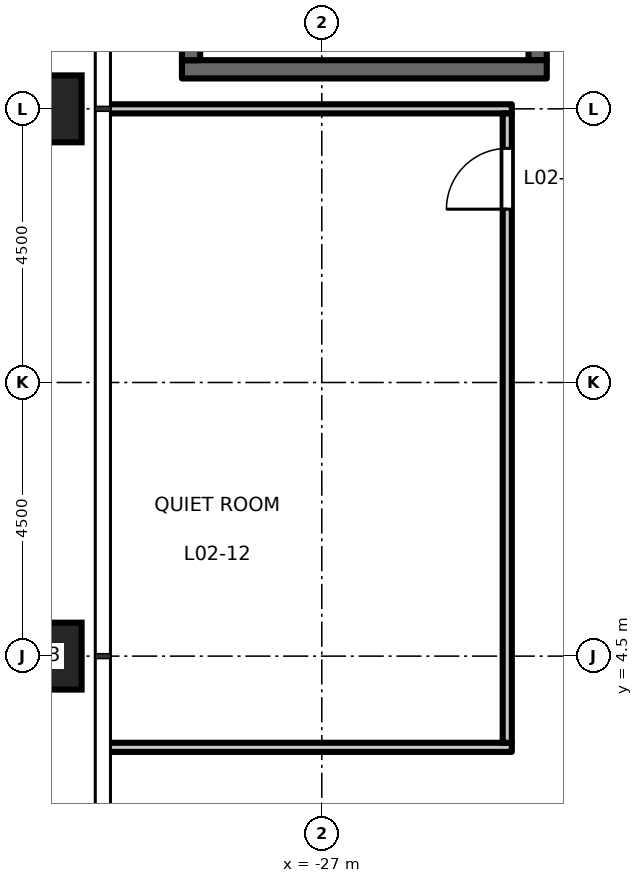
"""IFC4 building model, lengths in metres.
Left out: names, types, materials, properties, quantities, classifications, styles, units other than length and angle.
Written with IfcOpenShell. Run it as: python <this file> out.ifc"""

import sys

from ifc_helpers import new_model, si_unit, direction, frame, frame_2d, origin, origin_2d, place, context, subcontext, project, spatial, rectangle, hollow_rectangle, extrude, element, fill, save


model = new_model("IFC4")
c1 = context("Model", 3, precision=1e-05, world=origin(), true_north=direction((0.0, 1.0)))
c2 = subcontext(c1, "Body", "Model", "MODEL_VIEW")
j1 = project(units=[si_unit("LENGTHUNIT", "METRE"), si_unit("PLANEANGLEUNIT", "RADIAN")], contexts=[c1])
p1 = place(None, origin())
s1 = spatial("IfcSite", under=j1, at=p1, CompositionType="ELEMENT")
p2 = place(p1, origin())
s2 = spatial("IfcBuilding", under=s1, at=p2, CompositionType="ELEMENT")
p3 = place(p2, frame((0.0, 0.0, 12.2)))
s3 = spatial("IfcBuildingStorey", under=s2, at=p3, CompositionType="ELEMENT", Elevation=12.2)
for number, where, z_axis, x_axis in (
    (1, (-31.5, 13.5, 0.0), (0.0, 0.0, 1.0), (1.0, 0.0, 0.0)),
    (2, (-31.5, 4.5, 0.0), (0.0, 0.0, 1.0), (1.0, 0.0, 0.0)),
):
    element("IfcColumn", number, at=place(p3, frame(where, z_axis=z_axis, x_axis=x_axis)), inside=s3, PredefinedType="COLUMN", context=c2, shape_type="SweptSolid", body=[
        extrude(hollow_rectangle(XDim=1.1, YDim=1.1, WallThickness=0.07, at=origin_2d()), origin(), (0.0, 0.0, 1.0), 5.0),
    ])
p4 = place(p3, frame((-23.45, 14.3, 0.0), z_axis=(0.0, 0.0, 1.0), x_axis=(0.0, 1.0, 0.0)))
e3 = element("IfcWall", 3, at=p4, inside=s3, PredefinedType="SHEAR", context=c2, shape_type="SweptSolid", body=[
    extrude(rectangle(XDim=10.2, YDim=0.3, at=frame_2d((5.1, 0.0))), origin(), (0.0, 0.0, 1.0), 4.85),
])
p5 = place(p4, frame((0.2, 0.0, 0.0)))
e4 = element("IfcOpeningElement", 4, at=p5, cuts=e3, PredefinedType="OPENING", context=c2, shape_type="SweptSolid", body=[
    extrude(rectangle(XDim=1.8, YDim=2.1, at=frame_2d((0.9, 1.05))), frame((0.0, 0.16, 0.0), z_axis=(0.0, -1.0, 0.0), x_axis=(1.0, 0.0, 0.0)), (0.0, 0.0, 1.0), 0.32),
])
p6 = place(p3, frame((-29.3, 14.15, 0.0), z_axis=(0.0, 0.0, 1.0), x_axis=(1.0, 0.0, 0.0)))
e5 = element("IfcWall", 5, at=p6, inside=s3, PredefinedType="SHEAR", context=c2, shape_type="SweptSolid", body=[
    extrude(rectangle(XDim=6.0, YDim=0.3, at=frame_2d((3.0, 0.0))), origin(), (0.0, 0.0, 1.0), 4.85),
])
p7 = place(p3, frame((-29.15, 14.3, 0.0), z_axis=(0.0, 0.0, 1.0), x_axis=(0.0, 1.0, 0.0)))
e6 = element("IfcWall", 6, at=p7, inside=s3, PredefinedType="SHEAR", context=c2, shape_type="SweptSolid", body=[
    extrude(rectangle(XDim=10.2, YDim=0.3, at=frame_2d((5.1, 0.0))), origin(), (0.0, 0.0, 1.0), 4.85),
])
p8 = place(p3, frame((-30.51, 3.0, 0.0), z_axis=(0.0, 0.0, 1.0), x_axis=(1.0, 0.0, 0.0)))
e7 = element("IfcWall", 7, at=p8, inside=s3, PredefinedType="PARTITIONING", context=c2, shape_type="SweptSolid", body=[
    extrude(rectangle(XDim=6.635, YDim=0.15, at=frame_2d((3.317, 0.0))), origin(), (0.0, 0.0, 1.0), 4.85),
])
p9 = place(p3, frame((-30.51, 13.5, 0.0), z_axis=(0.0, 0.0, 1.0), x_axis=(1.0, 0.0, 0.0)))
e8 = element("IfcWall", 8, at=p9, inside=s3, PredefinedType="PARTITIONING", context=c2, shape_type="SweptSolid", body=[
    extrude(rectangle(XDim=6.635, YDim=0.15, at=frame_2d((3.317, 0.0))), origin(), (0.0, 0.0, 1.0), 3.85),
])
p10 = place(p3, frame((-23.95, 3.075, 0.0), z_axis=(0.0, 0.0, 1.0), x_axis=(0.0, 1.0, 0.0)))
e9 = element("IfcWall", 9, at=p10, inside=s3, PredefinedType="PARTITIONING", context=c2, shape_type="SweptSolid", body=[
    extrude(rectangle(XDim=10.35, YDim=0.15, at=frame_2d((5.175, 0.0))), origin(), (0.0, 0.0, 1.0), 4.85),
])
p11 = place(p10, frame((8.775, 0.0, 0.0)))
e10 = element("IfcOpeningElement", 10, at=p11, cuts=e9, PredefinedType="OPENING", context=c2, shape_type="SweptSolid", body=[
    extrude(rectangle(XDim=1.0, YDim=2.1, at=frame_2d((0.5, 1.05))), frame((0.0, 0.085, 0.0), z_axis=(0.0, -1.0, 0.0), x_axis=(1.0, 0.0, 0.0)), (0.0, 0.0, 1.0), 0.17),
])
p12 = place(p11, origin())
e11 = element("IfcDoor", 11, at=p12, inside=s3, OperationType="SINGLE_SWING_LEFT", PredefinedType="DOOR", context=c2, shape_type="SweptSolid", body=[
    extrude(rectangle(XDim=1.0, YDim=2.1, at=frame_2d((0.5, 1.05))), frame((0.0, 0.025, 0.0), z_axis=(0.0, -1.0, 0.0), x_axis=(1.0, 0.0, 0.0)), (0.0, 0.0, 1.0), 0.05),
])
fill(e10, e11)
save(model, sys.argv[1])
